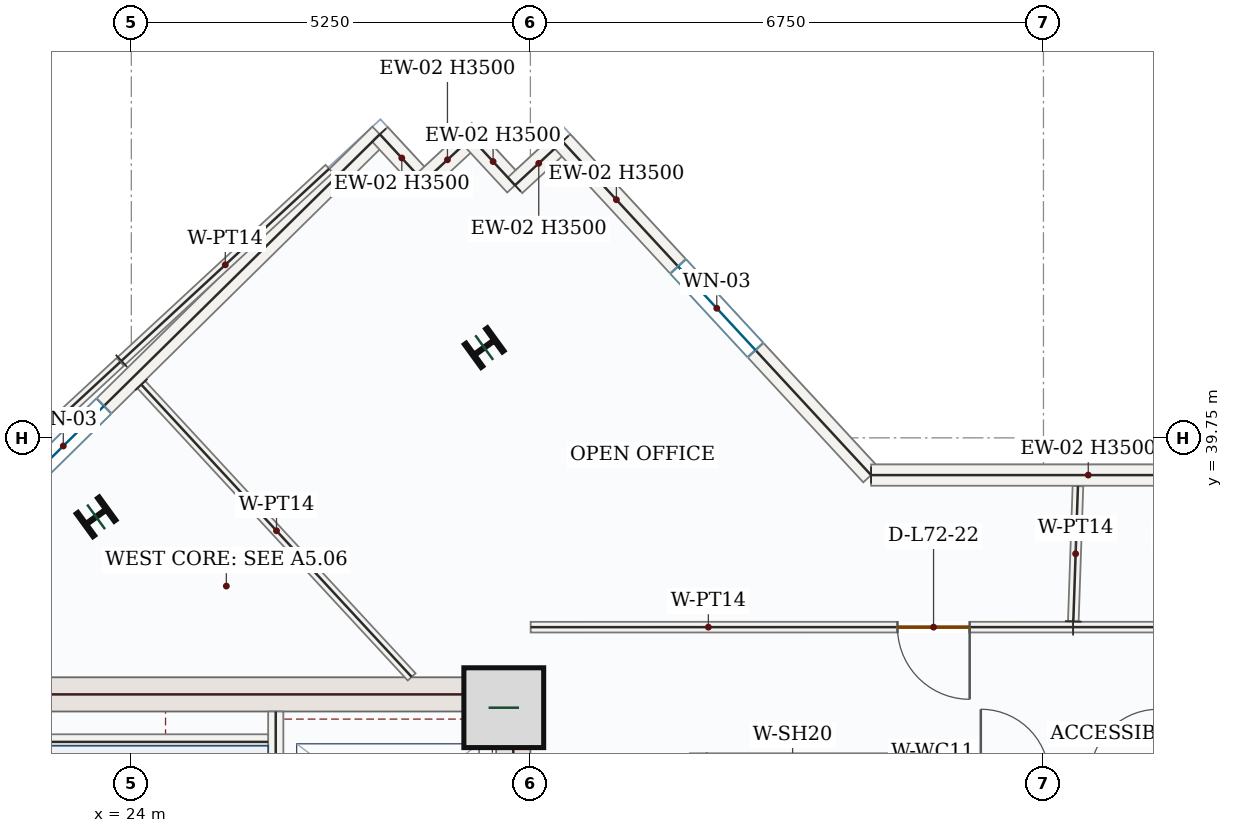
"""IFC4 building model, lengths in metres.
Left out: names, types, materials, properties, quantities, classifications, styles, units other than length and angle.
Written with IfcOpenShell. Run it as: python <this file> out.ifc"""

import sys

from ifc_helpers import new_model, si_unit, direction, frame, frame_2d, origin, origin_2d, place, context, subcontext, project, spatial, rectangle, i_section, extrude, source, transform, mapped, element, fill, save


model = new_model("IFC4")
c1 = context("Model", 3, precision=1e-05, world=origin(), true_north=direction((0.0, 1.0)))
c2 = subcontext(c1, "Body", "Model", "MODEL_VIEW")
j1 = project(units=[si_unit("LENGTHUNIT", "METRE"), si_unit("PLANEANGLEUNIT", "RADIAN")], contexts=[c1])
p1 = place(None, origin())
s1 = spatial("IfcSite", under=j1, at=p1, CompositionType="ELEMENT")
p2 = place(p1, origin())
s2 = spatial("IfcBuilding", under=s1, at=p2, CompositionType="ELEMENT")
p3 = place(p2, frame((0.0, 0.0, 299.1)))
s3 = spatial("IfcBuildingStorey", under=s2, at=p3, CompositionType="ELEMENT", Elevation=299.1)
p4 = place(p3, frame((29.025, 28.05, 0.0), z_axis=(0.0, 0.0, 1.0), x_axis=(0.0, 1.0, 0.0)))
e1 = element("IfcWall", 1, at=p4, inside=s3, PredefinedType="SHEAR", context=c2, shape_type="SweptSolid", body=[
    extrude(rectangle(XDim=8.55, YDim=0.45, at=frame_2d((4.275, 0.0))), origin(), (0.0, 0.0, 1.0), 3.5),
])
p5 = place(p4, frame((1.5, 0.0, 0.0)))
e2 = element("IfcOpeningElement", 2, at=p5, cuts=e1, PredefinedType="OPENING", context=c2, shape_type="SweptSolid", body=[
    extrude(rectangle(XDim=1.1, YDim=2.2, at=frame_2d((0.55, 1.1))), frame((0.0, 0.235, 0.0), z_axis=(0.0, -1.0, 0.0), x_axis=(1.0, 0.0, 0.0)), (0.0, 0.0, 1.0), 0.47),
])
m1 = source(origin(), c2, "Body", "SweptSolid", [
    extrude(rectangle(XDim=7.1, YDim=0.45, at=frame_2d((3.55, 0.0))), origin(), (0.0, 0.0, 1.0), 3.5),
])
p6 = place(p3, frame((21.7, 36.375, 0.0), z_axis=(0.0, 0.0, 1.0), x_axis=(1.0, 0.0, 0.0)))
e3 = element("IfcWall", 3, at=p6, inside=s3, PredefinedType="SHEAR", context=c2, shape_type="MappedRepresentation", body=[
    mapped(m1, transform((0.0, 0.0, 0.0), x_axis=(1.0, 0.0, 0.0), y_axis=(0.0, 1.0, 0.0), z_axis=(0.0, 0.0, 1.0), scale=1.0)),
])
m2 = source(origin(), c2, "Body", "SweptSolid", [
    extrude(rectangle(XDim=1.05, YDim=1.05, at=origin_2d()), origin(), (0.0, 0.0, 1.0), 3.75),
])
p7 = place(p3, frame((28.9, 36.2, 0.0), z_axis=(0.0, 0.0, 1.0), x_axis=(1.0, 0.0, 0.0)))
e4 = element("IfcColumn", 4, at=p7, inside=s3, PredefinedType="COLUMN", context=c2, shape_type="MappedRepresentation", body=[
    mapped(m2, transform((0.0, 0.0, 0.0), x_axis=(1.0, 0.0, 0.0), y_axis=(0.0, 1.0, 0.0), z_axis=(0.0, 0.0, 1.0), scale=1.0)),
])
m3 = source(origin(), c2, "Body", "SweptSolid", [
    extrude(i_section(OverallWidth=0.374, OverallDepth=0.372, WebThickness=0.016, FlangeThickness=0.026, FilletRadius=0.018, at=origin_2d()), origin(), (0.0, 0.0, 1.0), 3.75),
])
for number, where, z_axis, x_axis in (
    (5, (28.643, 40.937, 0.0), (0.0, 0.0, 1.0), (-0.588, 0.809, 0.0)),
    (6, (23.536, 38.711, 0.0), (0.0, 0.0, 1.0), (-0.588, 0.809, 0.0)),
):
    element("IfcColumn", number, at=place(p3, frame(where, z_axis=z_axis, x_axis=x_axis)), inside=s3, PredefinedType="COLUMN", context=c2, shape_type="MappedRepresentation", body=[
        mapped(m3, transform((0.0, 0.0, 0.0), x_axis=(1.0, 0.0, 0.0), y_axis=(0.0, 1.0, 0.0), z_axis=(0.0, 0.0, 1.0), scale=1.0)),
    ])
p8 = place(p3, frame((18.94, 35.542, 0.0), z_axis=(0.0, 0.0, 1.0), x_axis=(0.712557502542, 0.701613715353, 0.0)))
e7 = element("IfcWall", 7, at=p8, inside=s3, PredefinedType="SOLIDWALL", context=c2, shape_type="SweptSolid", body=[
    extrude(rectangle(XDim=11.69, YDim=0.28, at=frame_2d((5.845, 0.0))), origin(), (0.0, 0.0, 1.0), 3.5),
])
p9 = place(p8, frame((5.095, 0.0, 0.85)))
e8 = element("IfcOpeningElement", 8, at=p9, cuts=e7, PredefinedType="OPENING", context=c2, shape_type="SweptSolid", body=[
    extrude(rectangle(XDim=1.5, YDim=1.5, at=frame_2d((0.75, 0.75))), frame((0.0, 0.15, 0.0), z_axis=(0.0, -1.0, 0.0), x_axis=(1.0, 0.0, 0.0)), (0.0, 0.0, 1.0), 0.3),
])
m4 = source(origin(), c2, "Body", "SweptSolid", [
    extrude(rectangle(XDim=0.85, YDim=0.28, at=frame_2d((0.425, 0.0))), origin(), (0.0, 0.0, 1.0), 3.5),
])
for number, where, z_axis, x_axis in (
    (9, (27.27, 43.744, 0.0), (0.0, 0.0, 1.0), (0.679, -0.734, 0.0)),
    (10, (27.847, 43.12, 0.0), (0.0, 0.0, 1.0), (0.734, 0.679, 0.0)),
    (11, (28.471, 43.697, 0.0), (0.0, 0.0, 1.0), (0.679, -0.734, 0.0)),
):
    element("IfcWall", number, at=place(p3, frame(where, z_axis=z_axis, x_axis=x_axis)), inside=s3, PredefinedType="SOLIDWALL", context=c2, shape_type="MappedRepresentation", body=[
        mapped(m4, transform((0.0, 0.0, 0.0), x_axis=(1.0, 0.0, 0.0), y_axis=(0.0, 1.0, 0.0), z_axis=(0.0, 0.0, 1.0), scale=1.0)),
    ])
m5 = source(origin(), c2, "Body", "SweptSolid", [
    extrude(rectangle(XDim=0.85, YDim=0.28, at=frame_2d((0.425, 0.0))), origin(), (0.0, 0.0, 1.0), 3.5),
])
p10 = place(p3, frame((29.048, 43.073, 0.0), z_axis=(0.0, 0.0, 1.0), x_axis=(0.73428557742, 0.678840696183, 0.0)))
e12 = element("IfcWall", 12, at=p10, inside=s3, PredefinedType="SOLIDWALL", context=c2, shape_type="MappedRepresentation", body=[
    mapped(m5, transform((0.0, 0.0, 0.0), x_axis=(1.0, 0.0, 0.0), y_axis=(0.0, 1.0, 0.0), z_axis=(0.0, 0.0, 1.0), scale=1.0)),
])
p11 = place(p3, frame((29.672, 43.65, 0.0), z_axis=(0.0, 0.0, 1.0), x_axis=(0.679010627727, -0.734128440693, 0.0)))
e13 = element("IfcWall", 13, at=p11, inside=s3, PredefinedType="SOLIDWALL", context=c2, shape_type="SweptSolid", body=[
    extrude(rectangle(XDim=5.98, YDim=0.28, at=frame_2d((2.99, 0.0))), origin(), (0.0, 0.0, 1.0), 3.5),
])
p12 = place(p11, frame((2.24, 0.0, 0.85)))
e14 = element("IfcOpeningElement", 14, at=p12, cuts=e13, PredefinedType="OPENING", context=c2, shape_type="SweptSolid", body=[
    extrude(rectangle(XDim=1.5, YDim=1.5, at=frame_2d((0.75, 0.75))), frame((0.0, 0.15, 0.0), z_axis=(0.0, -1.0, 0.0), x_axis=(1.0, 0.0, 0.0)), (0.0, 0.0, 1.0), 0.3),
])
m6 = source(origin(), c2, "Body", "SweptSolid", [
    extrude(rectangle(XDim=5.714, YDim=0.28, at=frame_2d((2.857, 0.0))), origin(), (0.0, 0.0, 1.0), 3.5),
])
p13 = place(p3, frame((33.732, 39.26, 0.0), z_axis=(0.0, 0.0, 1.0), x_axis=(1.0, 0.0, 0.0)))
e15 = element("IfcWall", 15, at=p13, inside=s3, PredefinedType="SOLIDWALL", context=c2, shape_type="MappedRepresentation", body=[
    mapped(m6, transform((0.0, 0.0, 0.0), x_axis=(1.0, 0.0, 0.0), y_axis=(0.0, 1.0, 0.0), z_axis=(0.0, 0.0, 1.0), scale=1.0)),
])
p14 = place(p3, frame((25.9, 28.15, 0.0), z_axis=(0.0, 0.0, 1.0), x_axis=(0.0, 1.0, 0.0)))
e16 = element("IfcWall", 16, at=p14, inside=s3, PredefinedType="SOLIDWALL", context=c2, shape_type="SweptSolid", body=[
    extrude(rectangle(XDim=8.0, YDim=0.2, at=frame_2d((4.0, 0.0))), origin(), (0.0, 0.0, 1.0), 3.5),
])
p15 = place(p14, frame((0.4, 0.0, 0.0)))
e17 = element("IfcOpeningElement", 17, at=p15, cuts=e16, PredefinedType="OPENING", context=c2, shape_type="SweptSolid", body=[
    extrude(rectangle(XDim=1.05, YDim=2.15, at=frame_2d((0.525, 1.075))), frame((0.0, 0.11, 0.0), z_axis=(0.0, -1.0, 0.0), x_axis=(1.0, 0.0, 0.0)), (0.0, 0.0, 1.0), 0.22),
])
m7 = source(origin(), c2, "Body", "SweptSolid", [
    extrude(rectangle(XDim=3.25, YDim=0.2, at=frame_2d((1.625, 0.0))), origin(), (0.0, 0.0, 1.0), 3.5),
])
p16 = place(p3, frame((22.55, 35.75, 0.0), z_axis=(0.0, 0.0, 1.0), x_axis=(1.0, 0.0, 0.0)))
e18 = element("IfcWall", 18, at=p16, inside=s3, PredefinedType="SOLIDWALL", context=c2, shape_type="MappedRepresentation", body=[
    mapped(m7, transform((0.0, 0.0, 0.0), x_axis=(1.0, 0.0, 0.0), y_axis=(0.0, 1.0, 0.0), z_axis=(0.0, 0.0, 1.0), scale=1.0)),
])
p17 = place(p3, frame((31.45, 33.2, 0.0), z_axis=(0.0, 0.0, 1.0), x_axis=(0.0, 1.0, 0.0)))
e19 = element("IfcWall", 19, at=p17, inside=s3, PredefinedType="SOLIDWALL", context=c2, shape_type="SweptSolid", body=[
    extrude(rectangle(XDim=2.4, YDim=0.2, at=frame_2d((1.2, 0.0))), origin(), (0.0, 0.0, 1.0), 3.5),
])
p18 = place(p17, frame((0.65, 0.0, 0.0)))
e20 = element("IfcOpeningElement", 20, at=p18, cuts=e19, PredefinedType="OPENING", context=c2, shape_type="SweptSolid", body=[
    extrude(rectangle(XDim=1.1, YDim=2.15, at=frame_2d((0.55, 1.075))), frame((0.0, 0.11, 0.0), z_axis=(0.0, -1.0, 0.0), x_axis=(1.0, 0.0, 0.0)), (0.0, 0.0, 1.0), 0.22),
])
m8 = source(origin(), c2, "Body", "SweptSolid", [
    extrude(rectangle(XDim=2.4, YDim=0.2, at=frame_2d((1.2, 0.0))), origin(), (0.0, 0.0, 1.0), 3.5),
])
p19 = place(p3, frame((33.95, 33.2, 0.0), z_axis=(0.0, 0.0, 1.0), x_axis=(0.0, 1.0, 0.0)))
e21 = element("IfcWall", 21, at=p19, inside=s3, PredefinedType="SOLIDWALL", context=c2, shape_type="MappedRepresentation", body=[
    mapped(m8, transform((0.0, 0.0, 0.0), x_axis=(1.0, 0.0, 0.0), y_axis=(0.0, 1.0, 0.0), z_axis=(0.0, 0.0, 1.0), scale=1.0)),
])
m9 = source(origin(), c2, "Body", "SweptSolid", [
    extrude(rectangle(XDim=5.5, YDim=0.14, at=frame_2d((2.75, 0.0))), origin(), (0.0, 0.0, 1.0), 3.5),
])
p20 = place(p3, frame((19.818, 37.015, 0.0), z_axis=(0.0, 0.0, 1.0), x_axis=(0.734137611872, 0.679000711954, 0.0)))
e22 = element("IfcWall", 22, at=p20, inside=s3, PredefinedType="PARTITIONING", context=c2, shape_type="MappedRepresentation", body=[
    mapped(m9, transform((0.0, 0.0, 0.0), x_axis=(1.0, 0.0, 0.0), y_axis=(0.0, 1.0, 0.0), z_axis=(0.0, 0.0, 1.0), scale=1.0)),
])
m10 = source(origin(), c2, "Body", "SweptSolid", [
    extrude(rectangle(XDim=5.238, YDim=0.14, at=frame_2d((2.619, 0.0))), origin(), (0.0, 0.0, 1.0), 3.5),
])
p21 = place(p3, frame((24.132, 40.45, 0.0), z_axis=(0.0, 0.0, 1.0), x_axis=(0.67899802156, -0.734140100197, 0.0)))
e23 = element("IfcWall", 23, at=p21, inside=s3, PredefinedType="PARTITIONING", context=c2, shape_type="MappedRepresentation", body=[
    mapped(m10, transform((0.0, 0.0, 0.0), x_axis=(1.0, 0.0, 0.0), y_axis=(0.0, 1.0, 0.0), z_axis=(0.0, 0.0, 1.0), scale=1.0)),
])
p22 = place(p3, frame((42.742, 37.26, 0.0), z_axis=(0.0, 0.0, 1.0), x_axis=(-0.999999999261, 3.8433452e-05, 0.0)))
e24 = element("IfcWall", 24, at=p22, inside=s3, PredefinedType="PARTITIONING", context=c2, shape_type="SweptSolid", body=[
    extrude(rectangle(XDim=6.352, YDim=0.14, at=frame_2d((3.176, 0.0))), origin(), (0.0, 0.0, 1.0), 3.5),
])
p23 = place(p22, frame((4.214, 0.0, 0.0)))
e25 = element("IfcOpeningElement", 25, at=p23, cuts=e24, PredefinedType="OPENING", context=c2, shape_type="SweptSolid", body=[
    extrude(rectangle(XDim=0.95, YDim=2.15, at=frame_2d((0.475, 1.075))), frame((0.0, 0.08, 0.0), z_axis=(0.0, -1.0, 0.0), x_axis=(1.0, 0.0, 0.0)), (0.0, 0.0, 1.0), 0.16),
])
m11 = source(origin(), c2, "Body", "SweptSolid", [
    extrude(rectangle(XDim=1.781, YDim=0.14, at=frame_2d((0.891, 0.0))), origin(), (0.0, 0.0, 1.0), 3.5),
])
p24 = place(p3, frame((36.393, 37.335, 0.0), z_axis=(0.0, 0.0, 1.0), x_axis=(0.034268709891, 0.999412655274, 0.0)))
e26 = element("IfcWall", 26, at=p24, inside=s3, PredefinedType="PARTITIONING", context=c2, shape_type="MappedRepresentation", body=[
    mapped(m11, transform((0.0, 0.0, 0.0), x_axis=(1.0, 0.0, 0.0), y_axis=(0.0, 1.0, 0.0), z_axis=(0.0, 0.0, 1.0), scale=1.0)),
])
m12 = source(origin(), c2, "Body", "SweptSolid", [
    extrude(rectangle(XDim=3.722, YDim=0.14, at=frame_2d((1.861, 0.0))), origin(), (0.0, 0.0, 1.0), 3.5),
])
p25 = place(p3, frame((23.87, 40.763, 0.0), z_axis=(0.0, 0.0, 1.0), x_axis=(0.734119057589, 0.679020772352, 0.0)))
e27 = element("IfcWall", 27, at=p25, inside=s3, PredefinedType="PARTITIONING", context=c2, shape_type="MappedRepresentation", body=[
    mapped(m12, transform((0.0, 0.0, 0.0), x_axis=(1.0, 0.0, 0.0), y_axis=(0.0, 1.0, 0.0), z_axis=(0.0, 0.0, 1.0), scale=1.0)),
])
p26 = place(p3, frame((36.39, 37.26, 0.0), z_axis=(0.0, 0.0, 1.0), x_axis=(-0.999999997659, -6.8420512e-05, 0.0)))
e28 = element("IfcWall", 28, at=p26, inside=s3, PredefinedType="PARTITIONING", context=c2, shape_type="SweptSolid", body=[
    extrude(rectangle(XDim=7.136, YDim=0.14, at=frame_2d((3.568, 0.0))), origin(), (0.0, 0.0, 1.0), 3.5),
])
p27 = place(p26, frame((1.361, 0.0, 0.0)))
e29 = element("IfcOpeningElement", 29, at=p27, cuts=e28, PredefinedType="OPENING", context=c2, shape_type="SweptSolid", body=[
    extrude(rectangle(XDim=0.95, YDim=2.15, at=frame_2d((0.475, 1.075))), frame((0.0, 0.08, 0.0), z_axis=(0.0, -1.0, 0.0), x_axis=(1.0, 0.0, 0.0)), (0.0, 0.0, 1.0), 0.16),
])
m13 = source(origin(), c2, "Body", "SweptSolid", [
    extrude(rectangle(XDim=1.5, YDim=1.5, at=frame_2d((0.75, 0.75))), frame((0.0, 0.03, 0.0), z_axis=(0.0, -1.0, 0.0), x_axis=(1.0, 0.0, 0.0)), (0.0, 0.0, 1.0), 0.06),
])
p28 = place(p9, origin())
e30 = element("IfcWindow", 30, at=p28, inside=s3, PartitioningType="SINGLE_PANEL", PredefinedType="WINDOW", context=c2, shape_type="MappedRepresentation", body=[
    mapped(m13, transform((0.0, 0.0, 0.0), x_axis=(1.0, 0.0, 0.0), y_axis=(0.0, 1.0, 0.0), z_axis=(0.0, 0.0, 1.0), scale=1.0)),
])
fill(e8, e30)
p29 = place(p12, origin())
e31 = element("IfcWindow", 31, at=p29, inside=s3, PartitioningType="SINGLE_PANEL", PredefinedType="WINDOW", context=c2, shape_type="MappedRepresentation", body=[
    mapped(m13, transform((0.0, 0.0, 0.0), x_axis=(1.0, 0.0, 0.0), y_axis=(0.0, 1.0, 0.0), z_axis=(0.0, 0.0, 1.0), scale=1.0)),
])
fill(e14, e31)
m14 = source(origin(), c2, "Body", "SweptSolid", [
    extrude(rectangle(XDim=0.95, YDim=2.15, at=frame_2d((0.475, 1.075))), frame((0.0, 0.025, 0.0), z_axis=(0.0, -1.0, 0.0), x_axis=(1.0, 0.0, 0.0)), (0.0, 0.0, 1.0), 0.05),
])
p30 = place(p27, origin())
e32 = element("IfcDoor", 32, at=p30, inside=s3, OperationType="SINGLE_SWING_LEFT", PredefinedType="DOOR", context=c2, shape_type="MappedRepresentation", body=[
    mapped(m14, transform((0.0, 0.0, 0.0), x_axis=(1.0, 0.0, 0.0), y_axis=(0.0, 1.0, 0.0), z_axis=(0.0, 0.0, 1.0), scale=1.0)),
])
fill(e29, e32)
save(model, sys.argv[1])
